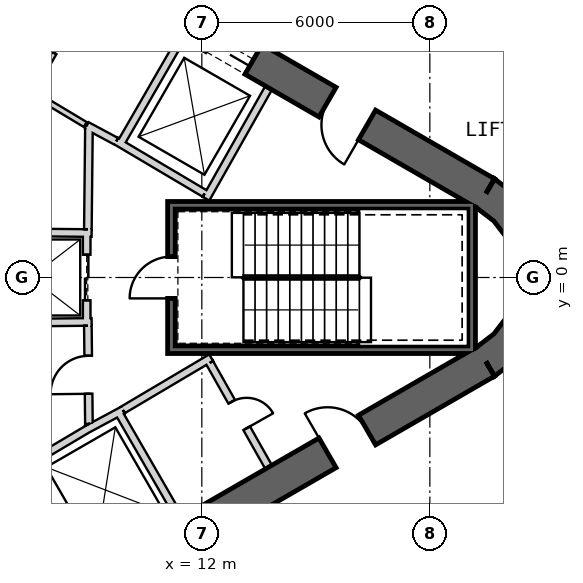
"""IFC4 building model, lengths in metres.
Left out: names, types, materials, properties, quantities, classifications, styles, units other than length and angle.
Written with IfcOpenShell. Run it as: python <this file> out.ifc"""

import sys

from ifc_helpers import new_model, si_unit, direction, frame, frame_2d, origin, place, context, subcontext, project, spatial, polyline, rectangle, outline, extrude, element, fill, save


model = new_model("IFC4")
c1 = context("Model", 3, precision=1e-05, world=origin(), true_north=direction((0.0, 1.0)))
c2 = subcontext(c1, "Body", "Model", "MODEL_VIEW")
j1 = project(units=[si_unit("LENGTHUNIT", "METRE"), si_unit("PLANEANGLEUNIT", "RADIAN")], contexts=[c1])
p1 = place(None, origin())
s1 = spatial("IfcSite", under=j1, at=p1, CompositionType="ELEMENT")
p2 = place(p1, origin())
s2 = spatial("IfcBuilding", under=s1, at=p2, CompositionType="ELEMENT")
p3 = place(p2, frame((0.0, 0.0, 333.8)))
s3 = spatial("IfcBuildingStorey", under=s2, at=p3, CompositionType="ELEMENT", Elevation=333.8)
p4 = place(p3, frame((19.475, 2.208, 0.0), z_axis=(0.0, 0.0, 1.0), x_axis=(-0.866028369851, 0.499994862586, 0.0)))
e1 = element("IfcWall", 1, at=p4, inside=s3, PredefinedType="SHEAR", context=c2, shape_type="SweptSolid", body=[
    extrude(rectangle(XDim=31.523, YDim=0.9, at=frame_2d((15.762, 0.0))), origin(), (0.0, 0.0, 1.0), 3.9),
])
p5 = place(p4, frame((7.062, 0.0, 0.0)))
e2 = element("IfcOpeningElement", 2, at=p5, cuts=e1, PredefinedType="OPENING", context=c2, shape_type="SweptSolid", body=[
    extrude(rectangle(XDim=1.2, YDim=2.4, at=frame_2d((0.6, 1.2))), frame((0.0, 0.46, 0.0), z_axis=(0.0, -1.0, 0.0), x_axis=(1.0, 0.0, 0.0)), (0.0, 0.0, 1.0), 0.92),
])
p6 = place(p4, frame((3.612, 0.0, 0.0)))
e3 = element("IfcOpeningElement", 3, at=p6, cuts=e1, PredefinedType="OPENING", context=c2, shape_type="SweptSolid", body=[
    extrude(rectangle(XDim=1.2, YDim=2.4, at=frame_2d((0.6, 1.2))), frame((0.0, 0.46, 0.0), z_axis=(0.0, -1.0, 0.0), x_axis=(1.0, 0.0, 0.0)), (0.0, 0.0, 1.0), 0.92),
])
p7 = place(p4, frame((26.712, 0.0, 0.0)))
e4 = element("IfcOpeningElement", 4, at=p7, cuts=e1, PredefinedType="OPENING", context=c2, shape_type="SweptSolid", body=[
    extrude(rectangle(XDim=1.2, YDim=2.4, at=frame_2d((0.6, 1.2))), frame((0.0, 0.46, 0.0), z_axis=(0.0, -1.0, 0.0), x_axis=(1.0, 0.0, 0.0)), (0.0, 0.0, 1.0), 0.92),
])
p8 = place(p3, frame((-7.825, -17.97, 0.0), z_axis=(0.0, 0.0, 1.0), x_axis=(0.866028369851, 0.499994862586, 0.0)))
e5 = element("IfcWall", 5, at=p8, inside=s3, PredefinedType="SHEAR", context=c2, shape_type="SweptSolid", body=[
    extrude(rectangle(XDim=31.523, YDim=0.9, at=frame_2d((15.762, 0.0))), origin(), (0.0, 0.0, 1.0), 3.9),
])
p9 = place(p8, frame((17.862, 0.0, 0.0)))
e6 = element("IfcOpeningElement", 6, at=p9, cuts=e5, PredefinedType="OPENING", context=c2, shape_type="SweptSolid", body=[
    extrude(rectangle(XDim=1.2, YDim=2.4, at=frame_2d((0.6, 1.2))), frame((0.0, 0.46, 0.0), z_axis=(0.0, -1.0, 0.0), x_axis=(1.0, 0.0, 0.0)), (0.0, 0.0, 1.0), 0.92),
])
p10 = place(p8, frame((20.562, 0.0, 0.0)))
e7 = element("IfcOpeningElement", 7, at=p10, cuts=e5, PredefinedType="OPENING", context=c2, shape_type="SweptSolid", body=[
    extrude(rectangle(XDim=1.2, YDim=2.4, at=frame_2d((0.6, 1.2))), frame((0.0, 0.46, 0.0), z_axis=(0.0, -1.0, 0.0), x_axis=(1.0, 0.0, 0.0)), (0.0, 0.0, 1.0), 0.92),
])
p11 = place(p8, frame((26.712, 0.0, 0.0)))
e8 = element("IfcOpeningElement", 8, at=p11, cuts=e5, PredefinedType="OPENING", context=c2, shape_type="SweptSolid", body=[
    extrude(rectangle(XDim=1.2, YDim=2.4, at=frame_2d((0.6, 1.2))), frame((0.0, 0.46, 0.0), z_axis=(0.0, -1.0, 0.0), x_axis=(1.0, 0.0, 0.0)), (0.0, 0.0, 1.0), 0.92),
])
p12 = place(p8, frame((3.612, 0.0, 0.0)))
e9 = element("IfcOpeningElement", 9, at=p12, cuts=e5, PredefinedType="OPENING", context=c2, shape_type="SweptSolid", body=[
    extrude(rectangle(XDim=1.2, YDim=2.4, at=frame_2d((0.6, 1.2))), frame((0.0, 0.46, 0.0), z_axis=(0.0, -1.0, 0.0), x_axis=(1.0, 0.0, 0.0)), (0.0, 0.0, 1.0), 0.92),
])
p13 = place(p3, origin())
e10 = element("IfcWall", 10, at=p13, inside=s3, PredefinedType="SHEAR", context=c2, shape_type="SweptSolid", body=[
    extrude(outline(polyline([(19.7, -2.598), (20.321, -2.121), (20.798, -1.5), (21.098, -0.777), (21.2, 0.0), (21.098, 0.777), (20.798, 1.5), (20.321, 2.121), (19.7, 2.598), (19.25, 1.819), (19.685, 1.485), (20.019, 1.05), (20.229, 0.543), (20.3, 0.0), (20.229, -0.543), (20.019, -1.05), (19.685, -1.485), (19.25, -1.819), (19.7, -2.598)])), origin(), (0.0, 0.0, 1.0), 3.9),
])
p14 = place(p3, frame((9.847, 3.495, 0.0), z_axis=(0.0, 0.0, 1.0), x_axis=(0.499984717929, 0.866034226713, 0.0)))
e11 = element("IfcWall", 11, at=p14, inside=s3, PredefinedType="PLUMBINGWALL", context=c2, shape_type="SweptSolid", body=[
    extrude(rectangle(XDim=3.25, YDim=0.2, at=frame_2d((1.625, 0.0))), origin(), (0.0, 0.0, 1.0), 3.6),
])
p15 = place(p3, frame((12.11, 2.073, 0.0), z_axis=(0.0, 0.0, 1.0), x_axis=(0.49196600604, 0.870614408852, 0.0)))
e12 = element("IfcWall", 12, at=p15, inside=s3, PredefinedType="PLUMBINGWALL", context=c2, shape_type="SweptSolid", body=[
    extrude(rectangle(XDim=3.35, YDim=0.2, at=frame_2d((1.675, 0.0))), origin(), (0.0, 0.0, 1.0), 3.6),
])
p16 = place(p3, frame((12.073, 2.211, 0.0), z_axis=(0.0, 0.0, 1.0), x_axis=(-0.860414880418, 0.509594185166, 0.0)))
e13 = element("IfcWall", 13, at=p16, inside=s3, PredefinedType="PLUMBINGWALL", context=c2, shape_type="SweptSolid", body=[
    extrude(rectangle(XDim=2.7, YDim=0.2, at=frame_2d((1.35, 0.0))), origin(), (0.0, 0.0, 1.0), 3.6),
])
p17 = place(p3, frame((9.795, -3.525, 0.0), z_axis=(0.0, 0.0, 1.0), x_axis=(0.499984717929, -0.866034226713, 0.0)))
e14 = element("IfcWall", 14, at=p17, inside=s3, PredefinedType="PLUMBINGWALL", context=c2, shape_type="SweptSolid", body=[
    extrude(rectangle(XDim=3.25, YDim=0.2, at=frame_2d((1.625, 0.0))), origin(), (0.0, 0.0, 1.0), 3.6),
])
p18 = place(p3, frame((8.974, -3.999, 0.0), z_axis=(0.0, 0.0, 1.0), x_axis=(0.880907015104, 0.473289373154, 0.0)))
e15 = element("IfcWall", 15, at=p18, inside=s3, PredefinedType="PLUMBINGWALL", context=c2, shape_type="SweptSolid", body=[
    extrude(rectangle(XDim=1.078, YDim=0.2, at=frame_2d((0.539, 0.0))), origin(), (0.0, 0.0, 1.0), 3.6),
])
p19 = place(p3, frame((7.493, -4.878, 0.0), z_axis=(0.0, 0.0, 1.0), x_axis=(0.859981807212, 0.510324691999, 0.0)))
e16 = element("IfcWall", 16, at=p19, inside=s3, PredefinedType="PLUMBINGWALL", context=c2, shape_type="SweptSolid", body=[
    extrude(rectangle(XDim=1.845, YDim=0.2, at=frame_2d((0.922, 0.0))), origin(), (0.0, 0.0, 1.0), 3.6),
])
p20 = place(p3, frame((19.2, 1.9, -0.3), z_axis=(0.0, 0.0, 1.0), x_axis=(-1.0, 0.0, 0.0)))
e17 = element("IfcWall", 17, at=p20, inside=s3, PredefinedType="SHEAR", context=c2, shape_type="SweptSolid", body=[
    extrude(rectangle(XDim=8.1, YDim=0.2, at=frame_2d((4.05, 0.0))), origin(), (0.0, 0.0, 1.0), 3.9),
])
p21 = place(p3, frame((19.1, -2.0, -0.3), z_axis=(0.0, 0.0, 1.0), x_axis=(0.0, 1.0, 0.0)))
e18 = element("IfcWall", 18, at=p21, inside=s3, PredefinedType="SHEAR", context=c2, shape_type="SweptSolid", body=[
    extrude(rectangle(XDim=3.8, YDim=0.2, at=frame_2d((1.9, 0.0))), origin(), (0.0, 0.0, 1.0), 3.9),
])
p22 = place(p3, frame((11.1, -1.9, -0.3), z_axis=(0.0, 0.0, 1.0), x_axis=(1.0, 0.0, 0.0)))
e19 = element("IfcWall", 19, at=p22, inside=s3, PredefinedType="SHEAR", context=c2, shape_type="SweptSolid", body=[
    extrude(rectangle(XDim=7.9, YDim=0.2, at=frame_2d((3.95, 0.0))), origin(), (0.0, 0.0, 1.0), 3.9),
])
p23 = place(p3, frame((11.2, -1.8, -0.3), z_axis=(0.0, 0.0, 1.0), x_axis=(0.0, 1.0, 0.0)))
e20 = element("IfcWall", 20, at=p23, inside=s3, PredefinedType="SHEAR", context=c2, shape_type="SweptSolid", body=[
    extrude(rectangle(XDim=3.6, YDim=0.2, at=frame_2d((1.8, 0.0))), origin(), (0.0, 0.0, 1.0), 3.9),
])
p24 = place(p23, frame((1.25, 0.0, 0.3)))
e21 = element("IfcOpeningElement", 21, at=p24, cuts=e20, PredefinedType="OPENING", context=c2, shape_type="SweptSolid", body=[
    extrude(rectangle(XDim=1.1, YDim=2.1, at=frame_2d((0.55, 1.05))), frame((0.0, 0.11, 0.0), z_axis=(0.0, -1.0, 0.0), x_axis=(1.0, 0.0, 0.0)), (0.0, 0.0, 1.0), 0.22),
])
p25 = place(p3, frame((8.97, 1.2, 0.0), z_axis=(0.0, 0.0, 1.0), x_axis=(0.0, -1.0, 0.0)))
e22 = element("IfcWall", 22, at=p25, inside=s3, PredefinedType="PLUMBINGWALL", context=c2, shape_type="SweptSolid", body=[
    extrude(rectangle(XDim=2.4, YDim=0.2, at=frame_2d((1.2, 0.0))), origin(), (0.0, 0.0, 1.0), 3.6),
])
p26 = place(p25, frame((0.6, 0.0, 0.0)))
e23 = element("IfcOpeningElement", 23, at=p26, cuts=e22, PredefinedType="OPENING", context=c2, shape_type="SweptSolid", body=[
    extrude(rectangle(XDim=1.2, YDim=2.4, at=frame_2d((0.6, 1.2))), frame((0.0, 0.11, 0.0), z_axis=(0.0, -1.0, 0.0), x_axis=(1.0, 0.0, 0.0)), (0.0, 0.0, 1.0), 0.22),
])
p27 = place(p3, frame((6.0, 1.2, 0.0), z_axis=(0.0, 0.0, 1.0), x_axis=(0.999949988, -0.010001074852, 0.0)))
e24 = element("IfcWall", 24, at=p27, inside=s3, PredefinedType="PLUMBINGWALL", context=c2, shape_type="SweptSolid", body=[
    extrude(rectangle(XDim=3.1, YDim=0.2, at=frame_2d((1.55, 0.0))), origin(), (0.0, 0.0, 1.0), 3.6),
])
p28 = place(p3, frame((5.9, -1.201, 0.0), z_axis=(0.0, 0.0, 1.0), x_axis=(0.999950064753, 0.009993397809, 0.0)))
e25 = element("IfcWall", 25, at=p28, inside=s3, PredefinedType="PLUMBINGWALL", context=c2, shape_type="SweptSolid", body=[
    extrude(rectangle(XDim=3.2, YDim=0.2, at=frame_2d((1.6, 0.0))), origin(), (0.0, 0.0, 1.0), 3.6),
])
p29 = place(p3, frame((7.508, 4.845, 0.0), z_axis=(0.0, 0.0, 1.0), x_axis=(0.500017246033, 0.866015446554, 0.0)))
e26 = element("IfcWall", 26, at=p29, inside=s3, PredefinedType="PARTITIONING", context=c2, shape_type="SweptSolid", body=[
    extrude(rectangle(XDim=3.25, YDim=0.12, at=frame_2d((1.625, 0.0))), origin(), (0.0, 0.0, 1.0), 3.6),
])
p30 = place(p29, frame((1.225, 0.0, 0.0)))
e27 = element("IfcOpeningElement", 27, at=p30, cuts=e26, PredefinedType="OPENING", context=c2, shape_type="SweptSolid", body=[
    extrude(rectangle(XDim=0.8, YDim=2.1, at=frame_2d((0.4, 1.05))), frame((0.0, 0.07, 0.0), z_axis=(0.0, -1.0, 0.0), x_axis=(1.0, 0.0, 0.0)), (0.0, 0.0, 1.0), 0.14),
])
p31 = place(p3, frame((8.974, 3.999, 0.0), z_axis=(0.0, 0.0, 1.0), x_axis=(0.880917147855, -0.473270513147, 0.0)))
e28 = element("IfcWall", 28, at=p31, inside=s3, PredefinedType="PARTITIONING", context=c2, shape_type="SweptSolid", body=[
    extrude(rectangle(XDim=0.878, YDim=0.2, at=frame_2d((0.439, 0.0))), origin(), (0.0, 0.0, 1.0), 3.6),
])
p32 = place(p3, frame((8.931, 4.026, 0.0), z_axis=(0.0, 0.0, 1.0), x_axis=(-0.857531586833, 0.514431314738, 0.0)))
e29 = element("IfcWall", 29, at=p32, inside=s3, PredefinedType="PLUMBINGWALL", context=c2, shape_type="SweptSolid", body=[
    extrude(rectangle(XDim=1.671, YDim=0.15, at=frame_2d((0.836, 0.0))), origin(), (0.0, 0.0, 1.0), 3.6),
])
p33 = place(p3, frame((12.245, -2.109, 0.0), z_axis=(0.0, 0.0, 1.0), x_axis=(-0.860414880418, -0.509594185166, 0.0)))
e30 = element("IfcWall", 30, at=p33, inside=s3, PredefinedType="PARTITIONING", context=c2, shape_type="SweptSolid", body=[
    extrude(rectangle(XDim=2.7, YDim=0.2, at=frame_2d((1.35, 0.0))), origin(), (0.0, 0.0, 1.0), 3.6),
])
p34 = place(p3, frame((13.758, -4.99, 0.0), z_axis=(0.0, 0.0, 1.0), x_axis=(-0.491993409184, 0.87059892334, 0.0)))
e31 = element("IfcWall", 31, at=p34, inside=s3, PredefinedType="PARTITIONING", context=c2, shape_type="SweptSolid", body=[
    extrude(rectangle(XDim=3.15, YDim=0.2, at=frame_2d((1.575, 0.0))), origin(), (0.0, 0.0, 1.0), 3.6),
])
p35 = place(p34, frame((1.175, 0.0, 0.0)))
e32 = element("IfcOpeningElement", 32, at=p35, cuts=e31, PredefinedType="OPENING", context=c2, shape_type="SweptSolid", body=[
    extrude(rectangle(XDim=0.8, YDim=2.1, at=frame_2d((0.4, 1.05))), frame((0.0, 0.11, 0.0), z_axis=(0.0, -1.0, 0.0), x_axis=(1.0, 0.0, 0.0)), (0.0, 0.0, 1.0), 0.22),
])
p36 = place(p3, frame((9.001, 1.27, 0.0), z_axis=(0.0, 0.0, 1.0), x_axis=(0.010751103362, 0.999942205218, 0.0)))
e33 = element("IfcWall", 33, at=p36, inside=s3, PredefinedType="PARTITIONING", context=c2, shape_type="SweptSolid", body=[
    extrude(rectangle(XDim=2.725, YDim=0.2, at=frame_2d((1.363, 0.0))), origin(), (0.0, 0.0, 1.0), 3.6),
])
p37 = place(p3, frame((9.029, -3.851, 0.0), z_axis=(0.0, 0.0, 1.0), x_axis=(-0.010783593937, 0.99994185536, 0.0)))
e34 = element("IfcWall", 34, at=p37, inside=s3, PredefinedType="PARTITIONING", context=c2, shape_type="SweptSolid", body=[
    extrude(rectangle(XDim=2.581, YDim=0.2, at=frame_2d((1.291, 0.0))), origin(), (0.0, 0.0, 1.0), 3.6),
])
p38 = place(p37, frame((0.791, 0.0, 0.0)))
e35 = element("IfcOpeningElement", 35, at=p38, cuts=e34, PredefinedType="OPENING", context=c2, shape_type="SweptSolid", body=[
    extrude(rectangle(XDim=1.0, YDim=2.1, at=frame_2d((0.5, 1.05))), frame((0.0, 0.11, 0.0), z_axis=(0.0, -1.0, 0.0), x_axis=(1.0, 0.0, 0.0)), (0.0, 0.0, 1.0), 0.22),
])
p39 = place(p3, frame((22.168, 5.099, 0.0), z_axis=(0.0, 0.0, 1.0), x_axis=(-0.866005628554, 0.500034250139, 0.0)))
e36 = element("IfcWall", 36, at=p39, inside=s3, PredefinedType="PARTITIONING", context=c2, shape_type="SweptSolid", body=[
    extrude(rectangle(XDim=2.892, YDim=0.12, at=frame_2d((1.446, 0.0))), origin(), (0.0, 0.0, 1.0), 3.6),
])
p40 = place(p39, frame((1.1, 0.0, 0.0)))
e37 = element("IfcOpeningElement", 37, at=p40, cuts=e36, PredefinedType="OPENING", context=c2, shape_type="SweptSolid", body=[
    extrude(rectangle(XDim=0.9, YDim=2.1, at=frame_2d((0.45, 1.05))), frame((0.0, 0.07, 0.0), z_axis=(0.0, -1.0, 0.0), x_axis=(1.0, 0.0, 0.0)), (0.0, 0.0, 1.0), 0.14),
])
p41 = place(p3, frame((-6.505, -21.885, 0.0), z_axis=(0.0, 0.0, 1.0), x_axis=(0.86602457258, 0.500001439686, 0.0)))
e38 = element("IfcWall", 38, at=p41, inside=s3, PredefinedType="PARTITIONING", context=c2, shape_type="SweptSolid", body=[
    extrude(rectangle(XDim=32.952, YDim=0.2, at=frame_2d((16.476, 0.0))), origin(), (0.0, 0.0, 1.0), 2.97),
])
p42 = place(p41, frame((28.061, 0.0, 0.0)))
e39 = element("IfcOpeningElement", 39, at=p42, cuts=e38, PredefinedType="OPENING", context=c2, shape_type="SweptSolid", body=[
    extrude(rectangle(XDim=1.0, YDim=2.1, at=frame_2d((0.5, 1.05))), frame((0.0, 0.11, 0.0), z_axis=(0.0, -1.0, 0.0), x_axis=(1.0, 0.0, 0.0)), (0.0, 0.0, 1.0), 0.22),
])
p43 = place(p41, frame((16.137, 0.0, 0.0)))
e40 = element("IfcOpeningElement", 40, at=p43, cuts=e38, PredefinedType="OPENING", context=c2, shape_type="SweptSolid", body=[
    extrude(rectangle(XDim=1.0, YDim=2.1, at=frame_2d((0.5, 1.05))), frame((0.0, 0.11, 0.0), z_axis=(0.0, -1.0, 0.0), x_axis=(1.0, 0.0, 0.0)), (0.0, 0.0, 1.0), 0.22),
])
p44 = place(p41, frame((4.101, 0.0, 0.0)))
e41 = element("IfcOpeningElement", 41, at=p44, cuts=e38, PredefinedType="OPENING", context=c2, shape_type="SweptSolid", body=[
    extrude(rectangle(XDim=1.0, YDim=2.1, at=frame_2d((0.5, 1.05))), frame((0.0, 0.11, 0.0), z_axis=(0.0, -1.0, 0.0), x_axis=(1.0, 0.0, 0.0)), (0.0, 0.0, 1.0), 0.22),
])
p45 = place(p24, origin())
e42 = element("IfcDoor", 42, at=p45, inside=s3, OperationType="SINGLE_SWING_RIGHT", PredefinedType="USERDEFINED", context=c2, shape_type="SweptSolid", body=[
    extrude(rectangle(XDim=1.1, YDim=2.1, at=frame_2d((0.55, 1.05))), frame((0.0, 0.025, 0.0), z_axis=(0.0, -1.0, 0.0), x_axis=(1.0, 0.0, 0.0)), (0.0, 0.0, 1.0), 0.05),
])
fill(e21, e42)
p46 = place(p38, origin())
e43 = element("IfcDoor", 43, at=p46, inside=s3, OperationType="SINGLE_SWING_RIGHT", PredefinedType="USERDEFINED", context=c2, shape_type="SweptSolid", body=[
    extrude(rectangle(XDim=1.0, YDim=2.1, at=frame_2d((0.5, 1.05))), frame((0.0, 0.025, 0.0), z_axis=(0.0, -1.0, 0.0), x_axis=(1.0, 0.0, 0.0)), (0.0, 0.0, 1.0), 0.05),
])
fill(e35, e43)
p47 = place(p26, origin())
e44 = element("IfcDoor", 44, at=p47, inside=s3, OperationType="SLIDING_TO_LEFT", PredefinedType="USERDEFINED", context=c2, shape_type="SweptSolid", body=[
    extrude(rectangle(XDim=1.2, YDim=2.4, at=frame_2d((0.6, 1.2))), frame((0.0, 0.025, 0.0), z_axis=(0.0, -1.0, 0.0), x_axis=(1.0, 0.0, 0.0)), (0.0, 0.0, 1.0), 0.05),
])
fill(e23, e44)
p48 = place(p30, origin())
e45 = element("IfcDoor", 45, at=p48, inside=s3, OperationType="SINGLE_SWING_LEFT", PredefinedType="USERDEFINED", context=c2, shape_type="SweptSolid", body=[
    extrude(rectangle(XDim=0.8, YDim=2.1, at=frame_2d((0.4, 1.05))), frame((0.0, 0.025, 0.0), z_axis=(0.0, -1.0, 0.0), x_axis=(1.0, 0.0, 0.0)), (0.0, 0.0, 1.0), 0.05),
])
fill(e27, e45)
p49 = place(p35, origin())
e46 = element("IfcDoor", 46, at=p49, inside=s3, OperationType="SINGLE_SWING_RIGHT", PredefinedType="USERDEFINED", context=c2, shape_type="SweptSolid", body=[
    extrude(rectangle(XDim=0.8, YDim=2.1, at=frame_2d((0.4, 1.05))), frame((0.0, 0.025, 0.0), z_axis=(0.0, -1.0, 0.0), x_axis=(1.0, 0.0, 0.0)), (0.0, 0.0, 1.0), 0.05),
])
fill(e32, e46)
p50 = place(p5, origin())
e47 = element("IfcDoor", 47, at=p50, inside=s3, OperationType="SLIDING_TO_LEFT", PredefinedType="USERDEFINED", context=c2, shape_type="SweptSolid", body=[
    extrude(rectangle(XDim=1.2, YDim=2.4, at=frame_2d((0.6, 1.2))), frame((0.0, 0.025, 0.0), z_axis=(0.0, -1.0, 0.0), x_axis=(1.0, 0.0, 0.0)), (0.0, 0.0, 1.0), 0.05),
])
fill(e2, e47)
p51 = place(p11, origin())
e48 = element("IfcDoor", 48, at=p51, inside=s3, OperationType="SINGLE_SWING_RIGHT", PredefinedType="USERDEFINED", context=c2, shape_type="SweptSolid", body=[
    extrude(rectangle(XDim=1.2, YDim=2.4, at=frame_2d((0.6, 1.2))), frame((0.0, 0.025, 0.0), z_axis=(0.0, -1.0, 0.0), x_axis=(1.0, 0.0, 0.0)), (0.0, 0.0, 1.0), 0.05),
])
fill(e8, e48)
p52 = place(p6, origin())
e49 = element("IfcDoor", 49, at=p52, inside=s3, OperationType="SINGLE_SWING_LEFT", PredefinedType="USERDEFINED", context=c2, shape_type="SweptSolid", body=[
    extrude(rectangle(XDim=1.2, YDim=2.4, at=frame_2d((0.6, 1.2))), frame((0.0, 0.025, 0.0), z_axis=(0.0, -1.0, 0.0), x_axis=(1.0, 0.0, 0.0)), (0.0, 0.0, 1.0), 0.05),
])
fill(e3, e49)
save(model, sys.argv[1])
